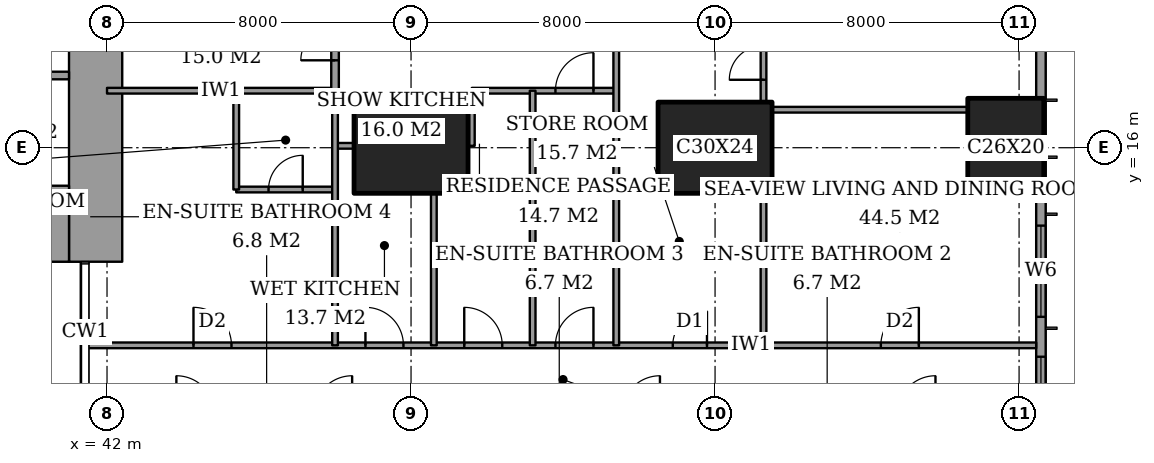
"""IFC4 building model, lengths in metres.
Left out: names, types, materials, properties, quantities, classifications, styles, units other than length and angle.
Written with IfcOpenShell. Run it as: python <this file> out.ifc"""

import sys

from ifc_helpers import new_model, si_unit, direction, frame, frame_2d, origin, origin_2d, place, context, subcontext, project, spatial, rectangle, extrude, element, fill, save


model = new_model("IFC4")
c1 = context("Model", 3, precision=1e-05, world=origin(), true_north=direction((0.0, 1.0)))
c2 = subcontext(c1, "Body", "Model", "MODEL_VIEW")
j1 = project(units=[si_unit("LENGTHUNIT", "METRE"), si_unit("PLANEANGLEUNIT", "RADIAN")], contexts=[c1])
p1 = place(None, origin())
s1 = spatial("IfcSite", under=j1, at=p1, CompositionType="ELEMENT")
p2 = place(p1, origin())
s2 = spatial("IfcBuilding", under=s1, at=p2, CompositionType="ELEMENT")
p3 = place(p2, frame((0.0, 0.0, 54.8)))
s3 = spatial("IfcBuildingStorey", under=s2, at=p3, CompositionType="ELEMENT", Elevation=54.8)
for number, where, z_axis, x_axis in (
    (1, (50.0, 16.0, 0.0), (0.0, 0.0, 1.0), (1.0, 0.0, 0.0)),
    (2, (58.0, 16.0, 0.0), (0.0, 0.0, 1.0), (1.0, 0.0, 0.0)),
):
    element("IfcColumn", number, at=place(p3, frame(where, z_axis=z_axis, x_axis=x_axis)), inside=s3, PredefinedType="COLUMN", context=c2, shape_type="SweptSolid", body=[
        extrude(rectangle(XDim=3.0, YDim=2.4, at=origin_2d()), origin(), (0.0, 0.0, 1.0), 3.6),
    ])
p4 = place(p3, frame((65.65, 16.0, 0.0), z_axis=(0.0, 0.0, 1.0), x_axis=(0.0, 1.0, 0.0)))
e3 = element("IfcColumn", 3, at=p4, inside=s3, PredefinedType="COLUMN", context=c2, shape_type="SweptSolid", body=[
    extrude(rectangle(XDim=2.6, YDim=2.0, at=origin_2d()), origin(), (0.0, 0.0, 1.0), 3.6),
])
p5 = place(p3, frame((37.85, 14.0, 0.0), z_axis=(0.0, 0.0, 1.0), x_axis=(1.0, 0.0, 0.0)))
e4 = element("IfcWall", 4, at=p5, inside=s3, PredefinedType="SHEAR", context=c2, shape_type="SweptSolid", body=[
    extrude(rectangle(XDim=3.15, YDim=2.0, at=frame_2d((1.575, 0.0))), origin(), (0.0, 0.0, 1.0), 3.6),
])
p6 = place(p3, frame((41.7, 13.0, 0.0), z_axis=(0.0, 0.0, 1.0), x_axis=(0.0, 1.0, 0.0)))
e5 = element("IfcWall", 5, at=p6, inside=s3, PredefinedType="SHEAR", context=c2, shape_type="SweptSolid", body=[
    extrude(rectangle(XDim=11.85, YDim=1.4, at=frame_2d((5.925, 0.0))), origin(), (0.0, 0.0, 1.0), 3.6),
])
p7 = place(p6, frame((7.5, 0.0, 0.0)))
e6 = element("IfcOpeningElement", 6, at=p7, cuts=e5, PredefinedType="OPENING", context=c2, shape_type="SweptSolid", body=[
    extrude(rectangle(XDim=1.8, YDim=2.4, at=frame_2d((0.9, 1.2))), frame((0.0, 0.71, 0.0), z_axis=(0.0, -1.0, 0.0), x_axis=(1.0, 0.0, 0.0)), (0.0, 0.0, 1.0), 1.42),
])
p8 = place(p3, frame((66.575, 3.175, 0.0), z_axis=(0.0, 0.0, 1.0), x_axis=(0.0, 1.0, 0.0)))
e7 = element("IfcWall", 7, at=p8, inside=s3, PredefinedType="SOLIDWALL", context=c2, shape_type="SweptSolid", body=[
    extrude(rectangle(XDim=41.65, YDim=0.25, at=frame_2d((20.825, 0.0))), origin(), (0.0, 0.0, 1.0), 3.6),
])
p9 = place(p8, frame((0.775, 0.0, 0.6)))
e8 = element("IfcOpeningElement", 8, at=p9, cuts=e7, PredefinedType="OPENING", context=c2, shape_type="SweptSolid", body=[
    extrude(rectangle(XDim=2.4, YDim=2.0, at=frame_2d((1.2, 1.0))), frame((0.0, 0.135, 0.0), z_axis=(0.0, -1.0, 0.0), x_axis=(1.0, 0.0, 0.0)), (0.0, 0.0, 1.0), 0.27),
])
p10 = place(p8, frame((6.125, 0.0, 0.6)))
e9 = element("IfcOpeningElement", 9, at=p10, cuts=e7, PredefinedType="OPENING", context=c2, shape_type="SweptSolid", body=[
    extrude(rectangle(XDim=1.2, YDim=2.0, at=frame_2d((0.6, 1.0))), frame((0.0, 0.135, 0.0), z_axis=(0.0, -1.0, 0.0), x_axis=(1.0, 0.0, 0.0)), (0.0, 0.0, 1.0), 0.27),
])
p11 = place(p8, frame((8.375, 0.0, 0.6)))
e10 = element("IfcOpeningElement", 10, at=p11, cuts=e7, PredefinedType="OPENING", context=c2, shape_type="SweptSolid", body=[
    extrude(rectangle(XDim=2.4, YDim=2.0, at=frame_2d((1.2, 1.0))), frame((0.0, 0.135, 0.0), z_axis=(0.0, -1.0, 0.0), x_axis=(1.0, 0.0, 0.0)), (0.0, 0.0, 1.0), 0.27),
])
p12 = place(p8, frame((15.775, 0.0, 0.6)))
e11 = element("IfcOpeningElement", 11, at=p12, cuts=e7, PredefinedType="OPENING", context=c2, shape_type="SweptSolid", body=[
    extrude(rectangle(XDim=2.4, YDim=2.0, at=frame_2d((1.2, 1.0))), frame((0.0, 0.135, 0.0), z_axis=(0.0, -1.0, 0.0), x_axis=(1.0, 0.0, 0.0)), (0.0, 0.0, 1.0), 0.27),
])
p13 = place(p8, frame((23.475, 0.0, 0.6)))
e12 = element("IfcOpeningElement", 12, at=p13, cuts=e7, PredefinedType="OPENING", context=c2, shape_type="SweptSolid", body=[
    extrude(rectangle(XDim=2.4, YDim=2.0, at=frame_2d((1.2, 1.0))), frame((0.0, 0.135, 0.0), z_axis=(0.0, -1.0, 0.0), x_axis=(1.0, 0.0, 0.0)), (0.0, 0.0, 1.0), 0.27),
])
p14 = place(p8, frame((30.775, 0.0, 0.6)))
e13 = element("IfcOpeningElement", 13, at=p14, cuts=e7, PredefinedType="OPENING", context=c2, shape_type="SweptSolid", body=[
    extrude(rectangle(XDim=2.4, YDim=2.0, at=frame_2d((1.2, 1.0))), frame((0.0, 0.135, 0.0), z_axis=(0.0, -1.0, 0.0), x_axis=(1.0, 0.0, 0.0)), (0.0, 0.0, 1.0), 0.27),
])
p15 = place(p8, frame((34.125, 0.0, 0.6)))
e14 = element("IfcOpeningElement", 14, at=p15, cuts=e7, PredefinedType="OPENING", context=c2, shape_type="SweptSolid", body=[
    extrude(rectangle(XDim=1.2, YDim=2.0, at=frame_2d((0.6, 1.0))), frame((0.0, 0.135, 0.0), z_axis=(0.0, -1.0, 0.0), x_axis=(1.0, 0.0, 0.0)), (0.0, 0.0, 1.0), 0.27),
])
p16 = place(p8, frame((38.475, 0.0, 0.6)))
e15 = element("IfcOpeningElement", 15, at=p16, cuts=e7, PredefinedType="OPENING", context=c2, shape_type="SweptSolid", body=[
    extrude(rectangle(XDim=2.4, YDim=2.0, at=frame_2d((1.2, 1.0))), frame((0.0, 0.135, 0.0), z_axis=(0.0, -1.0, 0.0), x_axis=(1.0, 0.0, 0.0)), (0.0, 0.0, 1.0), 0.27),
])
p17 = place(p3, frame((41.439, 10.8, 0.0), z_axis=(0.0, 0.0, 1.0), x_axis=(1.0, 0.0, 0.0)))
e16 = element("IfcWall", 16, at=p17, inside=s3, PredefinedType="PARTITIONING", context=c2, shape_type="SweptSolid", body=[
    extrude(rectangle(XDim=25.011, YDim=0.15, at=frame_2d((12.505, 0.0))), origin(), (0.0, 0.0, 1.0), 3.35),
])
p18 = place(p17, frame((12.361, 0.0, 0.0)))
e17 = element("IfcOpeningElement", 17, at=p18, cuts=e16, PredefinedType="OPENING", context=c2, shape_type="SweptSolid", body=[
    extrude(rectangle(XDim=1.0, YDim=2.1, at=frame_2d((0.5, 1.05))), frame((0.0, 0.085, 0.0), z_axis=(0.0, -1.0, 0.0), x_axis=(1.0, 0.0, 0.0)), (0.0, 0.0, 1.0), 0.17),
])
p19 = place(p17, frame((20.924, 0.0, 0.0)))
e18 = element("IfcOpeningElement", 18, at=p19, cuts=e16, PredefinedType="OPENING", context=c2, shape_type="SweptSolid", body=[
    extrude(rectangle(XDim=1.0, YDim=2.1, at=frame_2d((0.5, 1.05))), frame((0.0, 0.085, 0.0), z_axis=(0.0, -1.0, 0.0), x_axis=(1.0, 0.0, 0.0)), (0.0, 0.0, 1.0), 0.17),
])
p20 = place(p17, frame((15.448, 0.0, 0.0)))
e19 = element("IfcOpeningElement", 19, at=p20, cuts=e16, PredefinedType="OPENING", context=c2, shape_type="SweptSolid", body=[
    extrude(rectangle(XDim=0.9, YDim=2.1, at=frame_2d((0.45, 1.05))), frame((0.0, 0.085, 0.0), z_axis=(0.0, -1.0, 0.0), x_axis=(1.0, 0.0, 0.0)), (0.0, 0.0, 1.0), 0.17),
])
p21 = place(p17, frame((9.961, 0.0, 0.0)))
e20 = element("IfcOpeningElement", 20, at=p21, cuts=e16, PredefinedType="OPENING", context=c2, shape_type="SweptSolid", body=[
    extrude(rectangle(XDim=1.0, YDim=2.1, at=frame_2d((0.5, 1.05))), frame((0.0, 0.085, 0.0), z_axis=(0.0, -1.0, 0.0), x_axis=(1.0, 0.0, 0.0)), (0.0, 0.0, 1.0), 0.17),
])
p22 = place(p17, frame((7.361, 0.0, 0.0)))
e21 = element("IfcOpeningElement", 21, at=p22, cuts=e16, PredefinedType="OPENING", context=c2, shape_type="SweptSolid", body=[
    extrude(rectangle(XDim=1.0, YDim=2.1, at=frame_2d((0.5, 1.05))), frame((0.0, 0.085, 0.0), z_axis=(0.0, -1.0, 0.0), x_axis=(1.0, 0.0, 0.0)), (0.0, 0.0, 1.0), 0.17),
])
p23 = place(p17, frame((2.836, 0.0, 0.0)))
e22 = element("IfcOpeningElement", 22, at=p23, cuts=e16, PredefinedType="OPENING", context=c2, shape_type="SweptSolid", body=[
    extrude(rectangle(XDim=1.0, YDim=2.1, at=frame_2d((0.5, 1.05))), frame((0.0, 0.085, 0.0), z_axis=(0.0, -1.0, 0.0), x_axis=(1.0, 0.0, 0.0)), (0.0, 0.0, 1.0), 0.17),
])
p24 = place(p3, frame((45.4, 14.9, 0.0), z_axis=(0.0, 0.0, 1.0), x_axis=(1.0, 0.0, 0.0)))
e23 = element("IfcWall", 23, at=p24, inside=s3, PredefinedType="PARTITIONING", context=c2, shape_type="SweptSolid", body=[
    extrude(rectangle(XDim=2.6, YDim=0.15, at=frame_2d((1.3, 0.0))), origin(), (0.0, 0.0, 1.0), 3.35),
])
p25 = place(p24, frame((0.85, 0.0, 0.0)))
e24 = element("IfcOpeningElement", 24, at=p25, cuts=e23, PredefinedType="OPENING", context=c2, shape_type="SweptSolid", body=[
    extrude(rectangle(XDim=0.9, YDim=2.1, at=frame_2d((0.45, 1.05))), frame((0.0, 0.085, 0.0), z_axis=(0.0, -1.0, 0.0), x_axis=(1.0, 0.0, 0.0)), (0.0, 0.0, 1.0), 0.17),
])
p26 = place(p3, frame((55.4, 15.0, 0.0), z_axis=(0.0, 0.0, 1.0), x_axis=(1.0, 0.0, 0.0)))
e25 = element("IfcWall", 25, at=p26, inside=s3, PredefinedType="PARTITIONING", context=c2, shape_type="SweptSolid", body=[
    extrude(rectangle(XDim=1.1, YDim=0.15, at=frame_2d((0.55, 0.0))), origin(), (0.0, 0.0, 1.0), 3.35),
])
p27 = place(p3, frame((48.0, 16.05, 0.0), z_axis=(0.0, 0.0, 1.0), x_axis=(1.0, 0.0, 0.0)))
e26 = element("IfcWall", 26, at=p27, inside=s3, PredefinedType="PARTITIONING", context=c2, shape_type="SweptSolid", body=[
    extrude(rectangle(XDim=0.5, YDim=0.15, at=frame_2d((0.25, 0.0))), origin(), (0.0, 0.0, 1.0), 2.634),
])
p28 = place(p3, frame((59.5, 17.0, 0.0), z_axis=(0.0, 0.0, 1.0), x_axis=(1.0, 0.0, 0.0)))
e27 = element("IfcWall", 27, at=p28, inside=s3, PredefinedType="PARTITIONING", context=c2, shape_type="SweptSolid", body=[
    extrude(rectangle(XDim=5.15, YDim=0.15, at=frame_2d((2.575, 0.0))), origin(), (0.0, 0.0, 1.0), 3.35),
])
p29 = place(p3, frame((42.0, 17.5, 0.0), z_axis=(0.0, 0.0, 1.0), x_axis=(1.0, 0.0, 0.0)))
e28 = element("IfcWall", 28, at=p29, inside=s3, PredefinedType="PARTITIONING", context=c2, shape_type="SweptSolid", body=[
    extrude(rectangle(XDim=6.0, YDim=0.15, at=frame_2d((3.0, 0.0))), origin(), (0.0, 0.0, 1.0), 3.35),
])
p30 = place(p3, frame((51.6, 17.5, 0.0), z_axis=(0.0, 0.0, 1.0), x_axis=(1.0, 0.0, 0.0)))
e29 = element("IfcWall", 29, at=p30, inside=s3, PredefinedType="PARTITIONING", context=c2, shape_type="SweptSolid", body=[
    extrude(rectangle(XDim=3.8, YDim=0.15, at=frame_2d((1.9, 0.0))), origin(), (0.0, 0.0, 1.0), 3.35),
])
p31 = place(p30, frame((2.2, 0.0, 0.0)))
e30 = element("IfcOpeningElement", 30, at=p31, cuts=e29, PredefinedType="OPENING", context=c2, shape_type="SweptSolid", body=[
    extrude(rectangle(XDim=1.0, YDim=2.1, at=frame_2d((0.5, 1.05))), frame((0.0, 0.085, 0.0), z_axis=(0.0, -1.0, 0.0), x_axis=(1.0, 0.0, 0.0)), (0.0, 0.0, 1.0), 0.17),
])
p32 = place(p3, frame((45.4, 14.9, 0.0), z_axis=(0.0, 0.0, 1.0), x_axis=(0.0, 1.0, 0.0)))
e31 = element("IfcWall", 31, at=p32, inside=s3, PredefinedType="PARTITIONING", context=c2, shape_type="SweptSolid", body=[
    extrude(rectangle(XDim=2.6, YDim=0.15, at=frame_2d((1.3, 0.0))), origin(), (0.0, 0.0, 1.0), 3.35),
])
p33 = place(p3, frame((48.0, 17.5, 0.0), z_axis=(0.0, 0.0, 1.0), x_axis=(0.0, 1.0, 0.0)))
e32 = element("IfcWall", 32, at=p33, inside=s3, PredefinedType="PARTITIONING", context=c2, shape_type="SweptSolid", body=[
    extrude(rectangle(XDim=6.5, YDim=0.2, at=frame_2d((3.25, 0.0))), origin(), (0.0, 0.0, 1.0), 3.35),
])
p34 = place(p33, frame((3.9, 0.0, 0.0)))
e33 = element("IfcOpeningElement", 33, at=p34, cuts=e32, PredefinedType="OPENING", context=c2, shape_type="SweptSolid", body=[
    extrude(rectangle(XDim=1.2, YDim=2.4, at=frame_2d((0.6, 1.2))), frame((0.0, 0.11, 0.0), z_axis=(0.0, -1.0, 0.0), x_axis=(1.0, 0.0, 0.0)), (0.0, 0.0, 1.0), 0.22),
])
p35 = place(p33, frame((0.8, 0.0, 0.0)))
e34 = element("IfcOpeningElement", 34, at=p35, cuts=e32, PredefinedType="OPENING", context=c2, shape_type="SweptSolid", body=[
    extrude(rectangle(XDim=0.9, YDim=2.1, at=frame_2d((0.45, 1.05))), frame((0.0, 0.11, 0.0), z_axis=(0.0, -1.0, 0.0), x_axis=(1.0, 0.0, 0.0)), (0.0, 0.0, 1.0), 0.22),
])
p36 = place(p3, frame((48.0, 10.8, 0.0), z_axis=(0.0, 0.0, 1.0), x_axis=(0.0, 1.0, 0.0)))
e35 = element("IfcWall", 35, at=p36, inside=s3, PredefinedType="PARTITIONING", context=c2, shape_type="SweptSolid", body=[
    extrude(rectangle(XDim=6.7, YDim=0.15, at=frame_2d((3.35, 0.0))), origin(), (0.0, 0.0, 1.0), 3.35),
])
p37 = place(p3, frame((50.6, 10.8, 0.0), z_axis=(0.0, 0.0, 1.0), x_axis=(0.0, 1.0, 0.0)))
e36 = element("IfcWall", 36, at=p37, inside=s3, PredefinedType="PARTITIONING", context=c2, shape_type="SweptSolid", body=[
    extrude(rectangle(XDim=4.0, YDim=0.15, at=frame_2d((2.0, 0.0))), origin(), (0.0, 0.0, 1.0), 3.35),
])
p38 = place(p3, frame((51.6, 16.05, 0.0), z_axis=(0.0, 0.0, 1.0), x_axis=(0.0, 1.0, 0.0)))
e37 = element("IfcWall", 37, at=p38, inside=s3, PredefinedType="PARTITIONING", context=c2, shape_type="SweptSolid", body=[
    extrude(rectangle(XDim=1.45, YDim=0.15, at=frame_2d((0.725, 0.0))), origin(), (0.0, 0.0, 1.0), 3.35),
])
p39 = place(p3, frame((53.2, 10.8, 0.0), z_axis=(0.0, 0.0, 1.0), x_axis=(0.0, 1.0, 0.0)))
e38 = element("IfcWall", 38, at=p39, inside=s3, PredefinedType="PARTITIONING", context=c2, shape_type="SweptSolid", body=[
    extrude(rectangle(XDim=6.7, YDim=0.15, at=frame_2d((3.35, 0.0))), origin(), (0.0, 0.0, 1.0), 3.35),
])
p40 = place(p3, frame((55.4, 10.8, 0.0), z_axis=(0.0, 0.0, 1.0), x_axis=(0.0, 1.0, 0.0)))
e39 = element("IfcWall", 39, at=p40, inside=s3, PredefinedType="PARTITIONING", context=c2, shape_type="SweptSolid", body=[
    extrude(rectangle(XDim=10.8, YDim=0.15, at=frame_2d((5.4, 0.0))), origin(), (0.0, 0.0, 1.0), 3.35),
])
p41 = place(p40, frame((8.25, 0.0, 0.0)))
e40 = element("IfcOpeningElement", 40, at=p41, cuts=e39, PredefinedType="OPENING", context=c2, shape_type="SweptSolid", body=[
    extrude(rectangle(XDim=1.0, YDim=2.1, at=frame_2d((0.5, 1.05))), frame((0.0, 0.085, 0.0), z_axis=(0.0, -1.0, 0.0), x_axis=(1.0, 0.0, 0.0)), (0.0, 0.0, 1.0), 0.17),
])
p42 = place(p3, frame((59.275, 10.8, 0.0), z_axis=(0.0, 0.0, 1.0), x_axis=(0.0, 1.0, 0.0)))
e41 = element("IfcWall", 41, at=p42, inside=s3, PredefinedType="PARTITIONING", context=c2, shape_type="SweptSolid", body=[
    extrude(rectangle(XDim=4.0, YDim=0.15, at=frame_2d((2.0, 0.0))), origin(), (0.0, 0.0, 1.0), 3.35),
])
p43 = place(p3, frame((59.275, 17.2, 0.0), z_axis=(0.0, 0.0, 1.0), x_axis=(0.0, 1.0, 0.0)))
e42 = element("IfcWall", 42, at=p43, inside=s3, PredefinedType="PARTITIONING", context=c2, shape_type="SweptSolid", body=[
    extrude(rectangle(XDim=2.45, YDim=0.15, at=frame_2d((1.225, 0.0))), origin(), (0.0, 0.0, 1.0), 3.35),
])
p44 = place(p43, frame((0.587, 0.0, 0.0)))
e43 = element("IfcOpeningElement", 43, at=p44, cuts=e42, PredefinedType="OPENING", context=c2, shape_type="SweptSolid", body=[
    extrude(rectangle(XDim=0.9, YDim=2.1, at=frame_2d((0.45, 1.05))), frame((0.0, 0.085, 0.0), z_axis=(0.0, -1.0, 0.0), x_axis=(1.0, 0.0, 0.0)), (0.0, 0.0, 1.0), 0.17),
])
p45 = place(p3, frame((28.3, 17.9, 0.0), z_axis=(0.0, 0.0, 1.0), x_axis=(1.0, 0.0, 0.0)))
e44 = element("IfcWall", 44, at=p45, inside=s3, PredefinedType="PARTITIONING", context=c2, shape_type="SweptSolid", body=[
    extrude(rectangle(XDim=12.7, YDim=0.2, at=frame_2d((6.35, 0.0))), origin(), (0.0, 0.0, 1.0), 3.6),
])
p46 = place(p45, frame((0.95, 0.0, 0.0)))
e45 = element("IfcOpeningElement", 45, at=p46, cuts=e44, PredefinedType="OPENING", context=c2, shape_type="SweptSolid", body=[
    extrude(rectangle(XDim=1.1, YDim=2.1, at=frame_2d((0.55, 1.05))), frame((0.0, 0.11, 0.0), z_axis=(0.0, -1.0, 0.0), x_axis=(1.0, 0.0, 0.0)), (0.0, 0.0, 1.0), 0.22),
])
p47 = place(p45, frame((4.15, 0.0, 0.0)))
e46 = element("IfcOpeningElement", 46, at=p47, cuts=e44, PredefinedType="OPENING", context=c2, shape_type="SweptSolid", body=[
    extrude(rectangle(XDim=1.1, YDim=2.1, at=frame_2d((0.55, 1.05))), frame((0.0, 0.11, 0.0), z_axis=(0.0, -1.0, 0.0), x_axis=(1.0, 0.0, 0.0)), (0.0, 0.0, 1.0), 0.22),
])
p48 = place(p45, frame((7.35, 0.0, 0.0)))
e47 = element("IfcOpeningElement", 47, at=p48, cuts=e44, PredefinedType="OPENING", context=c2, shape_type="SweptSolid", body=[
    extrude(rectangle(XDim=1.1, YDim=2.1, at=frame_2d((0.55, 1.05))), frame((0.0, 0.11, 0.0), z_axis=(0.0, -1.0, 0.0), x_axis=(1.0, 0.0, 0.0)), (0.0, 0.0, 1.0), 0.22),
])
p49 = place(p45, frame((10.6, 0.0, 0.0)))
e48 = element("IfcOpeningElement", 48, at=p49, cuts=e44, PredefinedType="OPENING", context=c2, shape_type="SweptSolid", body=[
    extrude(rectangle(XDim=1.2, YDim=2.1, at=frame_2d((0.6, 1.05))), frame((0.0, 0.11, 0.0), z_axis=(0.0, -1.0, 0.0), x_axis=(1.0, 0.0, 0.0)), (0.0, 0.0, 1.0), 0.22),
])
p50 = place(p10, origin())
e49 = element("IfcWindow", 49, at=p50, inside=s3, PartitioningType="SINGLE_PANEL", PredefinedType="WINDOW", context=c2, shape_type="SweptSolid", body=[
    extrude(rectangle(XDim=1.2, YDim=2.0, at=frame_2d((0.6, 1.0))), frame((0.0, 0.03, 0.0), z_axis=(0.0, -1.0, 0.0), x_axis=(1.0, 0.0, 0.0)), (0.0, 0.0, 1.0), 0.06),
])
fill(e9, e49)
p51 = place(p11, origin())
e50 = element("IfcWindow", 50, at=p51, inside=s3, PartitioningType="SINGLE_PANEL", PredefinedType="WINDOW", context=c2, shape_type="SweptSolid", body=[
    extrude(rectangle(XDim=2.4, YDim=2.0, at=frame_2d((1.2, 1.0))), frame((0.0, 0.03, 0.0), z_axis=(0.0, -1.0, 0.0), x_axis=(1.0, 0.0, 0.0)), (0.0, 0.0, 1.0), 0.06),
])
fill(e10, e50)
p52 = place(p18, origin())
e51 = element("IfcDoor", 51, at=p52, inside=s3, OperationType="SINGLE_SWING_LEFT", PredefinedType="DOOR", context=c2, shape_type="SweptSolid", body=[
    extrude(rectangle(XDim=1.0, YDim=2.1, at=frame_2d((0.5, 1.05))), frame((0.0, 0.025, 0.0), z_axis=(0.0, -1.0, 0.0), x_axis=(1.0, 0.0, 0.0)), (0.0, 0.0, 1.0), 0.05),
])
fill(e17, e51)
p53 = place(p19, origin())
e52 = element("IfcDoor", 52, at=p53, inside=s3, OperationType="SINGLE_SWING_LEFT", PredefinedType="DOOR", context=c2, shape_type="SweptSolid", body=[
    extrude(rectangle(XDim=1.0, YDim=2.1, at=frame_2d((0.5, 1.05))), frame((0.0, 0.025, 0.0), z_axis=(0.0, -1.0, 0.0), x_axis=(1.0, 0.0, 0.0)), (0.0, 0.0, 1.0), 0.05),
])
fill(e18, e52)
p54 = place(p44, origin())
e53 = element("IfcDoor", 53, at=p54, inside=s3, OperationType="SINGLE_SWING_RIGHT", PredefinedType="DOOR", context=c2, shape_type="SweptSolid", body=[
    extrude(rectangle(XDim=0.9, YDim=2.1, at=frame_2d((0.45, 1.05))), frame((0.0, 0.025, 0.0), z_axis=(0.0, -1.0, 0.0), x_axis=(1.0, 0.0, 0.0)), (0.0, 0.0, 1.0), 0.05),
])
fill(e43, e53)
p55 = place(p20, origin())
e54 = element("IfcDoor", 54, at=p55, inside=s3, OperationType="SINGLE_SWING_LEFT", PredefinedType="DOOR", context=c2, shape_type="SweptSolid", body=[
    extrude(rectangle(XDim=0.9, YDim=2.1, at=frame_2d((0.45, 1.05))), frame((0.0, 0.025, 0.0), z_axis=(0.0, -1.0, 0.0), x_axis=(1.0, 0.0, 0.0)), (0.0, 0.0, 1.0), 0.05),
])
fill(e19, e54)
p56 = place(p31, origin())
e55 = element("IfcDoor", 55, at=p56, inside=s3, OperationType="SINGLE_SWING_LEFT", PredefinedType="DOOR", context=c2, shape_type="SweptSolid", body=[
    extrude(rectangle(XDim=1.0, YDim=2.1, at=frame_2d((0.5, 1.05))), frame((0.0, 0.025, 0.0), z_axis=(0.0, -1.0, 0.0), x_axis=(1.0, 0.0, 0.0)), (0.0, 0.0, 1.0), 0.05),
])
fill(e30, e55)
p57 = place(p21, origin())
e56 = element("IfcDoor", 56, at=p57, inside=s3, OperationType="SINGLE_SWING_RIGHT", PredefinedType="DOOR", context=c2, shape_type="SweptSolid", body=[
    extrude(rectangle(XDim=1.0, YDim=2.1, at=frame_2d((0.5, 1.05))), frame((0.0, 0.025, 0.0), z_axis=(0.0, -1.0, 0.0), x_axis=(1.0, 0.0, 0.0)), (0.0, 0.0, 1.0), 0.05),
])
fill(e20, e56)
p58 = place(p22, origin())
e57 = element("IfcDoor", 57, at=p58, inside=s3, OperationType="SINGLE_SWING_RIGHT", PredefinedType="DOOR", context=c2, shape_type="SweptSolid", body=[
    extrude(rectangle(XDim=1.0, YDim=2.1, at=frame_2d((0.5, 1.05))), frame((0.0, 0.025, 0.0), z_axis=(0.0, -1.0, 0.0), x_axis=(1.0, 0.0, 0.0)), (0.0, 0.0, 1.0), 0.05),
])
fill(e21, e57)
p59 = place(p25, origin())
e58 = element("IfcDoor", 58, at=p59, inside=s3, OperationType="SINGLE_SWING_LEFT", PredefinedType="DOOR", context=c2, shape_type="SweptSolid", body=[
    extrude(rectangle(XDim=0.9, YDim=2.1, at=frame_2d((0.45, 1.05))), frame((0.0, 0.025, 0.0), z_axis=(0.0, -1.0, 0.0), x_axis=(1.0, 0.0, 0.0)), (0.0, 0.0, 1.0), 0.05),
])
fill(e24, e58)
p60 = place(p23, origin())
e59 = element("IfcDoor", 59, at=p60, inside=s3, OperationType="SINGLE_SWING_RIGHT", PredefinedType="DOOR", context=c2, shape_type="SweptSolid", body=[
    extrude(rectangle(XDim=1.0, YDim=2.1, at=frame_2d((0.5, 1.05))), frame((0.0, 0.025, 0.0), z_axis=(0.0, -1.0, 0.0), x_axis=(1.0, 0.0, 0.0)), (0.0, 0.0, 1.0), 0.05),
])
fill(e22, e59)
p61 = place(p35, origin())
e60 = element("IfcDoor", 60, at=p61, inside=s3, OperationType="SINGLE_SWING_RIGHT", PredefinedType="DOOR", context=c2, shape_type="SweptSolid", body=[
    extrude(rectangle(XDim=0.9, YDim=2.1, at=frame_2d((0.45, 1.05))), frame((0.0, 0.025, 0.0), z_axis=(0.0, -1.0, 0.0), x_axis=(1.0, 0.0, 0.0)), (0.0, 0.0, 1.0), 0.05),
])
fill(e34, e60)
save(model, sys.argv[1])
